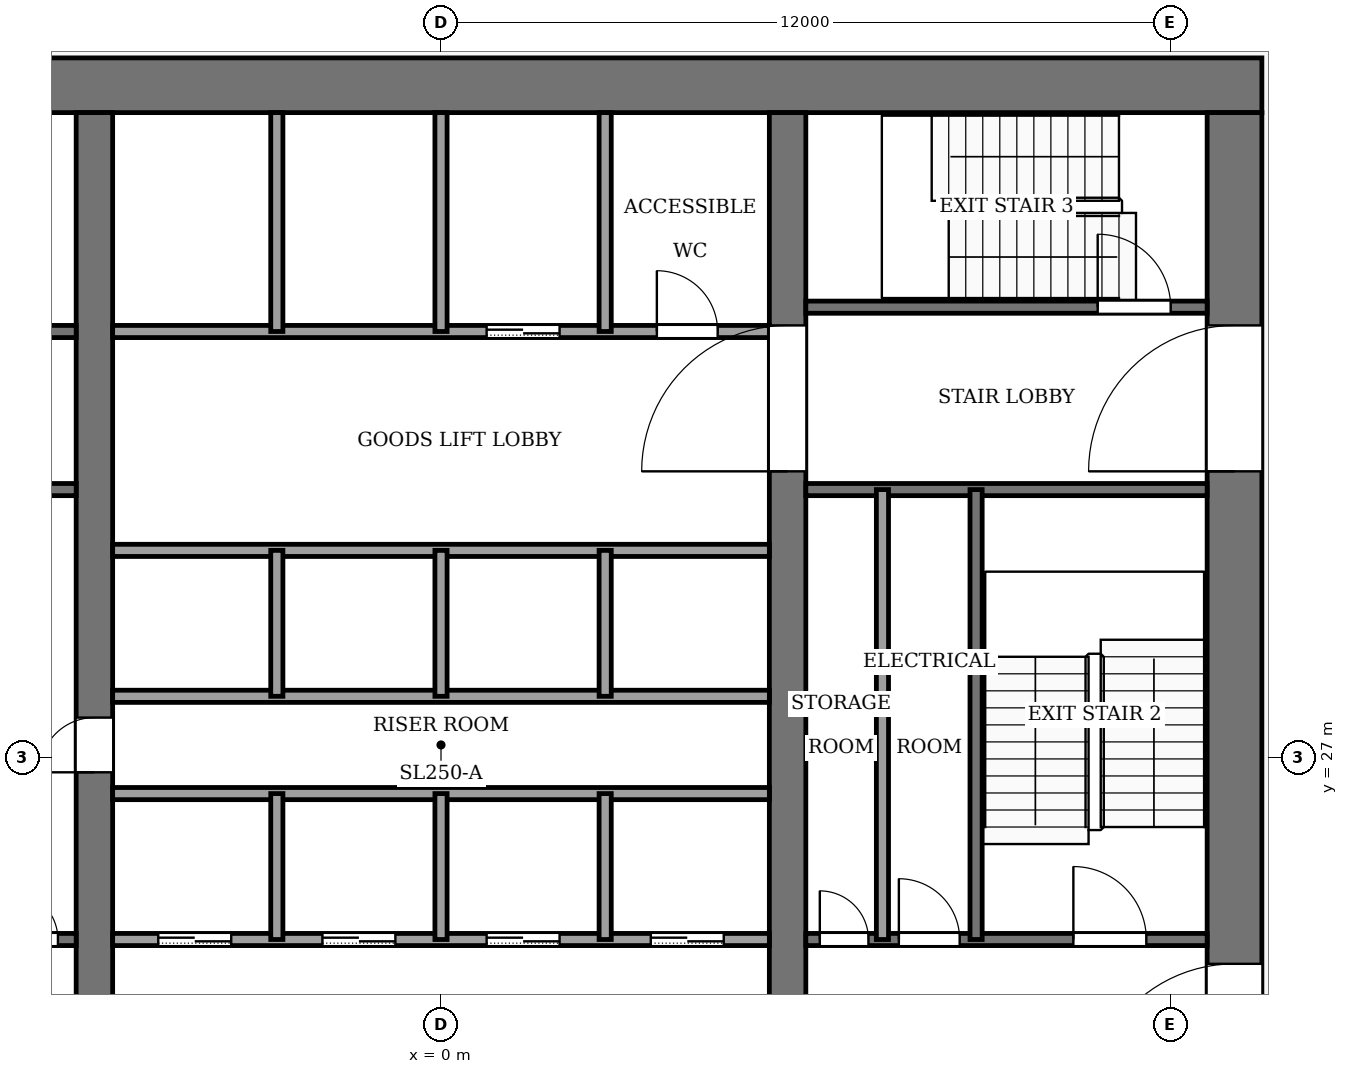
"""IFC4 building model, lengths in metres.
Left out: names, types, materials, properties, quantities, classifications, styles, units other than length and angle.
Written with IfcOpenShell. Run it as: python <this file> out.ifc"""

import sys

from ifc_helpers import new_model, si_unit, direction, frame, frame_2d, origin, place, context, subcontext, project, spatial, rectangle, extrude, element, fill, save


model = new_model("IFC4")
c1 = context("Model", 3, precision=1e-05, world=origin(), true_north=direction((0.0, 1.0)))
c2 = subcontext(c1, "Body", "Model", "MODEL_VIEW")
j1 = project(units=[si_unit("LENGTHUNIT", "METRE"), si_unit("PLANEANGLEUNIT", "RADIAN")], contexts=[c1])
p1 = place(None, origin())
s1 = spatial("IfcSite", under=j1, at=p1, CompositionType="ELEMENT")
p2 = place(p1, origin())
s2 = spatial("IfcBuilding", under=s1, at=p2, CompositionType="ELEMENT")
p3 = place(p2, frame((0.0, 0.0, 182.0)))
s3 = spatial("IfcBuildingStorey", under=s2, at=p3, CompositionType="ELEMENT", Elevation=182.0)
p4 = place(p3, frame((-13.5, 38.05, -0.13), z_axis=(0.0, 0.0, 1.0), x_axis=(1.0, 0.0, 0.0)))
e1 = element("IfcWall", 1, at=p4, inside=s3, PredefinedType="SHEAR", context=c2, shape_type="SweptSolid", body=[
    extrude(rectangle(XDim=27.0, YDim=0.9, at=frame_2d((13.5, 0.0))), origin(), (0.0, 0.0, 1.0), 4.0),
])
p5 = place(p3, frame((13.05, 18.4, -0.13), z_axis=(0.0, 0.0, 1.0), x_axis=(0.0, 1.0, 0.0)))
e2 = element("IfcWall", 2, at=p5, inside=s3, PredefinedType="SHEAR", context=c2, shape_type="SweptSolid", body=[
    extrude(rectangle(XDim=19.2, YDim=0.9, at=frame_2d((9.6, 0.0))), origin(), (0.0, 0.0, 1.0), 4.0),
])
p6 = place(p5, frame((2.8, 0.0, 0.13)))
e3 = element("IfcOpeningElement", 3, at=p6, cuts=e2, PredefinedType="OPENING", context=c2, shape_type="SweptSolid", body=[
    extrude(rectangle(XDim=2.4, YDim=2.4, at=frame_2d((1.2, 1.2))), frame((0.0, 0.46, 0.0), z_axis=(0.0, -1.0, 0.0), x_axis=(1.0, 0.0, 0.0)), (0.0, 0.0, 1.0), 0.92),
])
p7 = place(p5, frame((13.3, 0.0, 0.13)))
e4 = element("IfcOpeningElement", 4, at=p7, cuts=e2, PredefinedType="OPENING", context=c2, shape_type="SweptSolid", body=[
    extrude(rectangle(XDim=2.4, YDim=2.4, at=frame_2d((1.2, 1.2))), frame((0.0, 0.46, 0.0), z_axis=(0.0, -1.0, 0.0), x_axis=(1.0, 0.0, 0.0)), (0.0, 0.0, 1.0), 0.92),
])
p8 = place(p3, frame((-5.7, 18.4, -0.13), z_axis=(0.0, 0.0, 1.0), x_axis=(0.0, 1.0, 0.0)))
e5 = element("IfcWall", 5, at=p8, inside=s3, PredefinedType="SHEAR", context=c2, shape_type="SweptSolid", body=[
    extrude(rectangle(XDim=19.2, YDim=0.6, at=frame_2d((9.6, 0.0))), origin(), (0.0, 0.0, 1.0), 4.0),
])
p9 = place(p8, frame((8.35, 0.0, 0.13)))
e6 = element("IfcOpeningElement", 6, at=p9, cuts=e5, PredefinedType="OPENING", context=c2, shape_type="SweptSolid", body=[
    extrude(rectangle(XDim=0.9, YDim=2.1, at=frame_2d((0.45, 1.05))), frame((0.0, 0.31, 0.0), z_axis=(0.0, -1.0, 0.0), x_axis=(1.0, 0.0, 0.0)), (0.0, 0.0, 1.0), 0.62),
])
p10 = place(p3, frame((5.7, 18.4, -0.13), z_axis=(0.0, 0.0, 1.0), x_axis=(0.0, 1.0, 0.0)))
e7 = element("IfcWall", 7, at=p10, inside=s3, PredefinedType="SHEAR", context=c2, shape_type="SweptSolid", body=[
    extrude(rectangle(XDim=19.2, YDim=0.6, at=frame_2d((9.6, 0.0))), origin(), (0.0, 0.0, 1.0), 4.0),
])
p11 = place(p10, frame((13.3, 0.0, 0.13)))
e8 = element("IfcOpeningElement", 8, at=p11, cuts=e7, PredefinedType="OPENING", context=c2, shape_type="SweptSolid", body=[
    extrude(rectangle(XDim=2.4, YDim=2.4, at=frame_2d((1.2, 1.2))), frame((0.0, 0.31, 0.0), z_axis=(0.0, -1.0, 0.0), x_axis=(1.0, 0.0, 0.0)), (0.0, 0.0, 1.0), 0.62),
])
p12 = place(p3, frame((-12.6, 24.0, 0.0), z_axis=(0.0, 0.0, 1.0), x_axis=(1.0, 0.0, 0.0)))
e9 = element("IfcWall", 9, at=p12, inside=s3, PredefinedType="PARTITIONING", context=c2, shape_type="SweptSolid", body=[
    extrude(rectangle(XDim=6.6, YDim=0.2, at=frame_2d((3.3, 0.0))), origin(), (0.0, 0.0, 1.0), 3.87),
])
p13 = place(p12, frame((4.1, 0.0, 0.0)))
e10 = element("IfcOpeningElement", 10, at=p13, cuts=e9, PredefinedType="OPENING", context=c2, shape_type="SweptSolid", body=[
    extrude(rectangle(XDim=0.8, YDim=2.1, at=frame_2d((0.4, 1.05))), frame((0.0, 0.11, 0.0), z_axis=(0.0, -1.0, 0.0), x_axis=(1.0, 0.0, 0.0)), (0.0, 0.0, 1.0), 0.22),
])
p14 = place(p12, frame((5.5, 0.0, 0.0)))
e11 = element("IfcOpeningElement", 11, at=p14, cuts=e9, PredefinedType="OPENING", context=c2, shape_type="SweptSolid", body=[
    extrude(rectangle(XDim=0.8, YDim=2.1, at=frame_2d((0.4, 1.05))), frame((0.0, 0.11, 0.0), z_axis=(0.0, -1.0, 0.0), x_axis=(1.0, 0.0, 0.0)), (0.0, 0.0, 1.0), 0.22),
])
p15 = place(p3, frame((-5.4, 24.0, 0.0), z_axis=(0.0, 0.0, 1.0), x_axis=(1.0, 0.0, 0.0)))
e12 = element("IfcWall", 12, at=p15, inside=s3, PredefinedType="PARTITIONING", context=c2, shape_type="SweptSolid", body=[
    extrude(rectangle(XDim=10.8, YDim=0.2, at=frame_2d((5.4, 0.0))), origin(), (0.0, 0.0, 1.0), 3.87),
])
p16 = place(p15, frame((0.75, 0.0, 0.0)))
e13 = element("IfcOpeningElement", 13, at=p16, cuts=e12, PredefinedType="OPENING", context=c2, shape_type="SweptSolid", body=[
    extrude(rectangle(XDim=1.2, YDim=2.2, at=frame_2d((0.6, 1.1))), frame((0.0, 0.11, 0.0), z_axis=(0.0, -1.0, 0.0), x_axis=(1.0, 0.0, 0.0)), (0.0, 0.0, 1.0), 0.22),
])
p17 = place(p15, frame((3.45, 0.0, 0.0)))
e14 = element("IfcOpeningElement", 14, at=p17, cuts=e12, PredefinedType="OPENING", context=c2, shape_type="SweptSolid", body=[
    extrude(rectangle(XDim=1.2, YDim=2.2, at=frame_2d((0.6, 1.1))), frame((0.0, 0.11, 0.0), z_axis=(0.0, -1.0, 0.0), x_axis=(1.0, 0.0, 0.0)), (0.0, 0.0, 1.0), 0.22),
])
p18 = place(p15, frame((6.15, 0.0, 0.0)))
e15 = element("IfcOpeningElement", 15, at=p18, cuts=e12, PredefinedType="OPENING", context=c2, shape_type="SweptSolid", body=[
    extrude(rectangle(XDim=1.2, YDim=2.2, at=frame_2d((0.6, 1.1))), frame((0.0, 0.11, 0.0), z_axis=(0.0, -1.0, 0.0), x_axis=(1.0, 0.0, 0.0)), (0.0, 0.0, 1.0), 0.22),
])
p19 = place(p15, frame((8.85, 0.0, 0.0)))
e16 = element("IfcOpeningElement", 16, at=p19, cuts=e12, PredefinedType="OPENING", context=c2, shape_type="SweptSolid", body=[
    extrude(rectangle(XDim=1.2, YDim=2.2, at=frame_2d((0.6, 1.1))), frame((0.0, 0.11, 0.0), z_axis=(0.0, -1.0, 0.0), x_axis=(1.0, 0.0, 0.0)), (0.0, 0.0, 1.0), 0.22),
])
p20 = place(p3, frame((6.0, 24.0, 0.0), z_axis=(0.0, 0.0, 1.0), x_axis=(1.0, 0.0, 0.0)))
e17 = element("IfcWall", 17, at=p20, inside=s3, PredefinedType="PARTITIONING", context=c2, shape_type="SweptSolid", body=[
    extrude(rectangle(XDim=6.6, YDim=0.2, at=frame_2d((3.3, 0.0))), origin(), (0.0, 0.0, 1.0), 3.87),
])
p21 = place(p20, frame((0.23, 0.0, 0.0)))
e18 = element("IfcOpeningElement", 18, at=p21, cuts=e17, PredefinedType="OPENING", context=c2, shape_type="SweptSolid", body=[
    extrude(rectangle(XDim=0.8, YDim=2.1, at=frame_2d((0.4, 1.05))), frame((0.0, 0.11, 0.0), z_axis=(0.0, -1.0, 0.0), x_axis=(1.0, 0.0, 0.0)), (0.0, 0.0, 1.0), 0.22),
])
p22 = place(p20, frame((1.53, 0.0, 0.0)))
e19 = element("IfcOpeningElement", 19, at=p22, cuts=e17, PredefinedType="OPENING", context=c2, shape_type="SweptSolid", body=[
    extrude(rectangle(XDim=1.0, YDim=2.1, at=frame_2d((0.5, 1.05))), frame((0.0, 0.11, 0.0), z_axis=(0.0, -1.0, 0.0), x_axis=(1.0, 0.0, 0.0)), (0.0, 0.0, 1.0), 0.22),
])
p23 = place(p20, frame((4.4, 0.0, 0.0)))
e20 = element("IfcOpeningElement", 20, at=p23, cuts=e17, PredefinedType="OPENING", context=c2, shape_type="SweptSolid", body=[
    extrude(rectangle(XDim=1.2, YDim=2.2, at=frame_2d((0.6, 1.1))), frame((0.0, 0.11, 0.0), z_axis=(0.0, -1.0, 0.0), x_axis=(1.0, 0.0, 0.0)), (0.0, 0.0, 1.0), 0.22),
])
for number, where, z_axis, x_axis in (
    (21, (-5.4, 26.4, 0.0), (0.0, 0.0, 1.0), (1.0, 0.0, 0.0)),
    (22, (-5.4, 28.0, 0.0), (0.0, 0.0, 1.0), (1.0, 0.0, 0.0)),
    (23, (-5.4, 30.4, 0.0), (0.0, 0.0, 1.0), (1.0, 0.0, 0.0)),
):
    element("IfcWall", number, at=place(p3, frame(where, z_axis=z_axis, x_axis=x_axis)), inside=s3, PredefinedType="PARTITIONING", context=c2, shape_type="SweptSolid", body=[
        extrude(rectangle(XDim=10.8, YDim=0.2, at=frame_2d((5.4, 0.0))), origin(), (0.0, 0.0, 1.0), 3.87),
    ])
p24 = place(p3, frame((-12.6, 31.4, 0.0), z_axis=(0.0, 0.0, 1.0), x_axis=(1.0, 0.0, 0.0)))
e24 = element("IfcWall", 24, at=p24, inside=s3, PredefinedType="PARTITIONING", context=c2, shape_type="SweptSolid", body=[
    extrude(rectangle(XDim=6.6, YDim=0.2, at=frame_2d((3.3, 0.0))), origin(), (0.0, 0.0, 1.0), 3.87),
])
p25 = place(p24, frame((1.0, 0.0, 0.0)))
e25 = element("IfcOpeningElement", 25, at=p25, cuts=e24, PredefinedType="OPENING", context=c2, shape_type="SweptSolid", body=[
    extrude(rectangle(XDim=1.2, YDim=2.2, at=frame_2d((0.6, 1.1))), frame((0.0, 0.11, 0.0), z_axis=(0.0, -1.0, 0.0), x_axis=(1.0, 0.0, 0.0)), (0.0, 0.0, 1.0), 0.22),
])
p26 = place(p3, frame((6.0, 31.4, 0.0), z_axis=(0.0, 0.0, 1.0), x_axis=(1.0, 0.0, 0.0)))
e26 = element("IfcWall", 26, at=p26, inside=s3, PredefinedType="PARTITIONING", context=c2, shape_type="SweptSolid", body=[
    extrude(rectangle(XDim=6.6, YDim=0.2, at=frame_2d((3.3, 0.0))), origin(), (0.0, 0.0, 1.0), 3.87),
])
p27 = place(p3, frame((-12.6, 34.0, 0.0), z_axis=(0.0, 0.0, 1.0), x_axis=(1.0, 0.0, 0.0)))
e27 = element("IfcWall", 27, at=p27, inside=s3, PredefinedType="PARTITIONING", context=c2, shape_type="SweptSolid", body=[
    extrude(rectangle(XDim=6.6, YDim=0.2, at=frame_2d((3.3, 0.0))), origin(), (0.0, 0.0, 1.0), 3.87),
])
p28 = place(p27, frame((4.7, 0.0, 0.0)))
e28 = element("IfcOpeningElement", 28, at=p28, cuts=e27, PredefinedType="OPENING", context=c2, shape_type="SweptSolid", body=[
    extrude(rectangle(XDim=1.4, YDim=2.2, at=frame_2d((0.7, 1.1))), frame((0.0, 0.11, 0.0), z_axis=(0.0, -1.0, 0.0), x_axis=(1.0, 0.0, 0.0)), (0.0, 0.0, 1.0), 0.22),
])
p29 = place(p27, frame((2.3, 0.0, 0.0)))
e29 = element("IfcOpeningElement", 29, at=p29, cuts=e27, PredefinedType="OPENING", context=c2, shape_type="SweptSolid", body=[
    extrude(rectangle(XDim=1.4, YDim=2.2, at=frame_2d((0.7, 1.1))), frame((0.0, 0.11, 0.0), z_axis=(0.0, -1.0, 0.0), x_axis=(1.0, 0.0, 0.0)), (0.0, 0.0, 1.0), 0.22),
])
p30 = place(p27, frame((0.45, 0.0, 0.0)))
e30 = element("IfcOpeningElement", 30, at=p30, cuts=e27, PredefinedType="OPENING", context=c2, shape_type="SweptSolid", body=[
    extrude(rectangle(XDim=0.9, YDim=2.1, at=frame_2d((0.45, 1.05))), frame((0.0, 0.11, 0.0), z_axis=(0.0, -1.0, 0.0), x_axis=(1.0, 0.0, 0.0)), (0.0, 0.0, 1.0), 0.22),
])
p31 = place(p3, frame((-5.4, 34.0, 0.0), z_axis=(0.0, 0.0, 1.0), x_axis=(1.0, 0.0, 0.0)))
e31 = element("IfcWall", 31, at=p31, inside=s3, PredefinedType="PARTITIONING", context=c2, shape_type="SweptSolid", body=[
    extrude(rectangle(XDim=10.8, YDim=0.2, at=frame_2d((5.4, 0.0))), origin(), (0.0, 0.0, 1.0), 3.87),
])
p32 = place(p31, frame((6.15, 0.0, 0.0)))
e32 = element("IfcOpeningElement", 32, at=p32, cuts=e31, PredefinedType="OPENING", context=c2, shape_type="SweptSolid", body=[
    extrude(rectangle(XDim=1.2, YDim=2.2, at=frame_2d((0.6, 1.1))), frame((0.0, 0.11, 0.0), z_axis=(0.0, -1.0, 0.0), x_axis=(1.0, 0.0, 0.0)), (0.0, 0.0, 1.0), 0.22),
])
p33 = place(p31, frame((8.95, 0.0, 0.0)))
e33 = element("IfcOpeningElement", 33, at=p33, cuts=e31, PredefinedType="OPENING", context=c2, shape_type="SweptSolid", body=[
    extrude(rectangle(XDim=1.0, YDim=2.1, at=frame_2d((0.5, 1.05))), frame((0.0, 0.11, 0.0), z_axis=(0.0, -1.0, 0.0), x_axis=(1.0, 0.0, 0.0)), (0.0, 0.0, 1.0), 0.22),
])
p34 = place(p3, frame((6.0, 34.4, 0.0), z_axis=(0.0, 0.0, 1.0), x_axis=(1.0, 0.0, 0.0)))
e34 = element("IfcWall", 34, at=p34, inside=s3, PredefinedType="PARTITIONING", context=c2, shape_type="SweptSolid", body=[
    extrude(rectangle(XDim=6.6, YDim=0.2, at=frame_2d((3.3, 0.0))), origin(), (0.0, 0.0, 1.0), 3.87),
])
p35 = place(p34, frame((4.8, 0.0, 0.0)))
e35 = element("IfcOpeningElement", 35, at=p35, cuts=e34, PredefinedType="OPENING", context=c2, shape_type="SweptSolid", body=[
    extrude(rectangle(XDim=1.2, YDim=2.2, at=frame_2d((0.6, 1.1))), frame((0.0, 0.11, 0.0), z_axis=(0.0, -1.0, 0.0), x_axis=(1.0, 0.0, 0.0)), (0.0, 0.0, 1.0), 0.22),
])
for number, where, z_axis, x_axis in (
    (36, (-2.7, 24.0, 0.0), (0.0, 0.0, 1.0), (0.0, 1.0, 0.0)),
    (37, (-2.7, 28.0, 0.0), (0.0, 0.0, 1.0), (0.0, 1.0, 0.0)),
):
    element("IfcWall", number, at=place(p3, frame(where, z_axis=z_axis, x_axis=x_axis)), inside=s3, PredefinedType="PARTITIONING", context=c2, shape_type="SweptSolid", body=[
        extrude(rectangle(XDim=2.4, YDim=0.2, at=frame_2d((1.2, 0.0))), origin(), (0.0, 0.0, 1.0), 3.87),
    ])
p36 = place(p3, frame((-2.7, 34.0, 0.0), z_axis=(0.0, 0.0, 1.0), x_axis=(0.0, 1.0, 0.0)))
e38 = element("IfcWall", 38, at=p36, inside=s3, PredefinedType="PARTITIONING", context=c2, shape_type="SweptSolid", body=[
    extrude(rectangle(XDim=3.6, YDim=0.2, at=frame_2d((1.8, 0.0))), origin(), (0.0, 0.0, 1.0), 3.87),
])
for number, where, z_axis, x_axis in (
    (39, (0.0, 24.0, 0.0), (0.0, 0.0, 1.0), (0.0, 1.0, 0.0)),
    (40, (0.0, 28.0, 0.0), (0.0, 0.0, 1.0), (0.0, 1.0, 0.0)),
):
    element("IfcWall", number, at=place(p3, frame(where, z_axis=z_axis, x_axis=x_axis)), inside=s3, PredefinedType="PARTITIONING", context=c2, shape_type="SweptSolid", body=[
        extrude(rectangle(XDim=2.4, YDim=0.2, at=frame_2d((1.2, 0.0))), origin(), (0.0, 0.0, 1.0), 3.87),
    ])
p37 = place(p3, frame((0.0, 34.0, 0.0), z_axis=(0.0, 0.0, 1.0), x_axis=(0.0, 1.0, 0.0)))
e41 = element("IfcWall", 41, at=p37, inside=s3, PredefinedType="PARTITIONING", context=c2, shape_type="SweptSolid", body=[
    extrude(rectangle(XDim=3.6, YDim=0.2, at=frame_2d((1.8, 0.0))), origin(), (0.0, 0.0, 1.0), 3.87),
])
for number, where, z_axis, x_axis in (
    (42, (2.7, 24.0, 0.0), (0.0, 0.0, 1.0), (0.0, 1.0, 0.0)),
    (43, (2.7, 28.0, 0.0), (0.0, 0.0, 1.0), (0.0, 1.0, 0.0)),
):
    element("IfcWall", number, at=place(p3, frame(where, z_axis=z_axis, x_axis=x_axis)), inside=s3, PredefinedType="PARTITIONING", context=c2, shape_type="SweptSolid", body=[
        extrude(rectangle(XDim=2.4, YDim=0.2, at=frame_2d((1.2, 0.0))), origin(), (0.0, 0.0, 1.0), 3.87),
    ])
p38 = place(p3, frame((2.7, 34.0, 0.0), z_axis=(0.0, 0.0, 1.0), x_axis=(0.0, 1.0, 0.0)))
e44 = element("IfcWall", 44, at=p38, inside=s3, PredefinedType="PARTITIONING", context=c2, shape_type="SweptSolid", body=[
    extrude(rectangle(XDim=3.6, YDim=0.2, at=frame_2d((1.8, 0.0))), origin(), (0.0, 0.0, 1.0), 3.87),
])
for number, where, z_axis, x_axis in (
    (45, (7.26, 24.0, 0.0), (0.0, 0.0, 1.0), (0.0, 1.0, 0.0)),
    (46, (8.8, 24.0, 0.0), (0.0, 0.0, 1.0), (0.0, 1.0, 0.0)),
):
    element("IfcWall", number, at=place(p3, frame(where, z_axis=z_axis, x_axis=x_axis)), inside=s3, PredefinedType="PARTITIONING", context=c2, shape_type="SweptSolid", body=[
        extrude(rectangle(XDim=7.4, YDim=0.2, at=frame_2d((3.7, 0.0))), origin(), (0.0, 0.0, 1.0), 3.87),
    ])
p39 = place(p16, origin())
e47 = element("IfcDoor", 47, at=p39, inside=s3, OperationType="SLIDING_TO_LEFT", PredefinedType="DOOR", context=c2, shape_type="SweptSolid", body=[
    extrude(rectangle(XDim=1.2, YDim=2.2, at=frame_2d((0.6, 1.1))), frame((0.0, 0.025, 0.0), z_axis=(0.0, -1.0, 0.0), x_axis=(1.0, 0.0, 0.0)), (0.0, 0.0, 1.0), 0.05),
])
fill(e13, e47)
p40 = place(p17, origin())
e48 = element("IfcDoor", 48, at=p40, inside=s3, OperationType="SLIDING_TO_LEFT", PredefinedType="DOOR", context=c2, shape_type="SweptSolid", body=[
    extrude(rectangle(XDim=1.2, YDim=2.2, at=frame_2d((0.6, 1.1))), frame((0.0, 0.025, 0.0), z_axis=(0.0, -1.0, 0.0), x_axis=(1.0, 0.0, 0.0)), (0.0, 0.0, 1.0), 0.05),
])
fill(e14, e48)
p41 = place(p18, origin())
e49 = element("IfcDoor", 49, at=p41, inside=s3, OperationType="SLIDING_TO_LEFT", PredefinedType="DOOR", context=c2, shape_type="SweptSolid", body=[
    extrude(rectangle(XDim=1.2, YDim=2.2, at=frame_2d((0.6, 1.1))), frame((0.0, 0.025, 0.0), z_axis=(0.0, -1.0, 0.0), x_axis=(1.0, 0.0, 0.0)), (0.0, 0.0, 1.0), 0.05),
])
fill(e15, e49)
p42 = place(p19, origin())
e50 = element("IfcDoor", 50, at=p42, inside=s3, OperationType="SLIDING_TO_LEFT", PredefinedType="DOOR", context=c2, shape_type="SweptSolid", body=[
    extrude(rectangle(XDim=1.2, YDim=2.2, at=frame_2d((0.6, 1.1))), frame((0.0, 0.025, 0.0), z_axis=(0.0, -1.0, 0.0), x_axis=(1.0, 0.0, 0.0)), (0.0, 0.0, 1.0), 0.05),
])
fill(e16, e50)
p43 = place(p32, origin())
e51 = element("IfcDoor", 51, at=p43, inside=s3, OperationType="SLIDING_TO_LEFT", PredefinedType="DOOR", context=c2, shape_type="SweptSolid", body=[
    extrude(rectangle(XDim=1.2, YDim=2.2, at=frame_2d((0.6, 1.1))), frame((0.0, 0.025, 0.0), z_axis=(0.0, -1.0, 0.0), x_axis=(1.0, 0.0, 0.0)), (0.0, 0.0, 1.0), 0.05),
])
fill(e32, e51)
p44 = place(p14, origin())
e52 = element("IfcDoor", 52, at=p44, inside=s3, OperationType="SINGLE_SWING_RIGHT", PredefinedType="DOOR", context=c2, shape_type="SweptSolid", body=[
    extrude(rectangle(XDim=0.8, YDim=2.1, at=frame_2d((0.4, 1.05))), frame((0.0, 0.025, 0.0), z_axis=(0.0, -1.0, 0.0), x_axis=(1.0, 0.0, 0.0)), (0.0, 0.0, 1.0), 0.05),
])
fill(e11, e52)
p45 = place(p21, origin())
e53 = element("IfcDoor", 53, at=p45, inside=s3, OperationType="SINGLE_SWING_RIGHT", PredefinedType="DOOR", context=c2, shape_type="SweptSolid", body=[
    extrude(rectangle(XDim=0.8, YDim=2.1, at=frame_2d((0.4, 1.05))), frame((0.0, 0.025, 0.0), z_axis=(0.0, -1.0, 0.0), x_axis=(1.0, 0.0, 0.0)), (0.0, 0.0, 1.0), 0.05),
])
fill(e18, e53)
p46 = place(p22, origin())
e54 = element("IfcDoor", 54, at=p46, inside=s3, OperationType="SINGLE_SWING_LEFT", PredefinedType="DOOR", context=c2, shape_type="SweptSolid", body=[
    extrude(rectangle(XDim=1.0, YDim=2.1, at=frame_2d((0.5, 1.05))), frame((0.0, 0.025, 0.0), z_axis=(0.0, -1.0, 0.0), x_axis=(1.0, 0.0, 0.0)), (0.0, 0.0, 1.0), 0.05),
])
fill(e19, e54)
p47 = place(p33, origin())
e55 = element("IfcDoor", 55, at=p47, inside=s3, OperationType="SINGLE_SWING_LEFT", PredefinedType="DOOR", context=c2, shape_type="SweptSolid", body=[
    extrude(rectangle(XDim=1.0, YDim=2.1, at=frame_2d((0.5, 1.05))), frame((0.0, 0.025, 0.0), z_axis=(0.0, -1.0, 0.0), x_axis=(1.0, 0.0, 0.0)), (0.0, 0.0, 1.0), 0.05),
])
fill(e33, e55)
p48 = place(p9, origin())
e56 = element("IfcDoor", 56, at=p48, inside=s3, OperationType="SINGLE_SWING_RIGHT", PredefinedType="DOOR", context=c2, shape_type="SweptSolid", body=[
    extrude(rectangle(XDim=0.9, YDim=2.1, at=frame_2d((0.45, 1.05))), frame((0.0, 0.025, 0.0), z_axis=(0.0, -1.0, 0.0), x_axis=(1.0, 0.0, 0.0)), (0.0, 0.0, 1.0), 0.05),
])
fill(e6, e56)
p49 = place(p23, origin())
e57 = element("IfcDoor", 57, at=p49, inside=s3, OperationType="SINGLE_SWING_LEFT", PredefinedType="DOOR", context=c2, shape_type="SweptSolid", body=[
    extrude(rectangle(XDim=1.2, YDim=2.2, at=frame_2d((0.6, 1.1))), frame((0.0, 0.025, 0.0), z_axis=(0.0, -1.0, 0.0), x_axis=(1.0, 0.0, 0.0)), (0.0, 0.0, 1.0), 0.05),
])
fill(e20, e57)
p50 = place(p35, origin())
e58 = element("IfcDoor", 58, at=p50, inside=s3, OperationType="SINGLE_SWING_RIGHT", PredefinedType="DOOR", context=c2, shape_type="SweptSolid", body=[
    extrude(rectangle(XDim=1.2, YDim=2.2, at=frame_2d((0.6, 1.1))), frame((0.0, 0.025, 0.0), z_axis=(0.0, -1.0, 0.0), x_axis=(1.0, 0.0, 0.0)), (0.0, 0.0, 1.0), 0.05),
])
fill(e35, e58)
p51 = place(p11, origin())
e59 = element("IfcDoor", 59, at=p51, inside=s3, OperationType="DOUBLE_DOOR_SINGLE_SWING", PredefinedType="DOOR", context=c2, shape_type="SweptSolid", body=[
    extrude(rectangle(XDim=2.4, YDim=2.4, at=frame_2d((1.2, 1.2))), frame((0.0, 0.025, 0.0), z_axis=(0.0, -1.0, 0.0), x_axis=(1.0, 0.0, 0.0)), (0.0, 0.0, 1.0), 0.05),
])
fill(e8, e59)
p52 = place(p6, origin())
e60 = element("IfcDoor", 60, at=p52, inside=s3, OperationType="DOUBLE_DOOR_SINGLE_SWING", PredefinedType="DOOR", context=c2, shape_type="SweptSolid", body=[
    extrude(rectangle(XDim=2.4, YDim=2.4, at=frame_2d((1.2, 1.2))), frame((0.0, 0.025, 0.0), z_axis=(0.0, -1.0, 0.0), x_axis=(1.0, 0.0, 0.0)), (0.0, 0.0, 1.0), 0.05),
])
fill(e3, e60)
p53 = place(p7, origin())
e61 = element("IfcDoor", 61, at=p53, inside=s3, OperationType="DOUBLE_DOOR_SINGLE_SWING", PredefinedType="DOOR", context=c2, shape_type="SweptSolid", body=[
    extrude(rectangle(XDim=2.4, YDim=2.4, at=frame_2d((1.2, 1.2))), frame((0.0, 0.025, 0.0), z_axis=(0.0, -1.0, 0.0), x_axis=(1.0, 0.0, 0.0)), (0.0, 0.0, 1.0), 0.05),
])
fill(e4, e61)
save(model, sys.argv[1])
